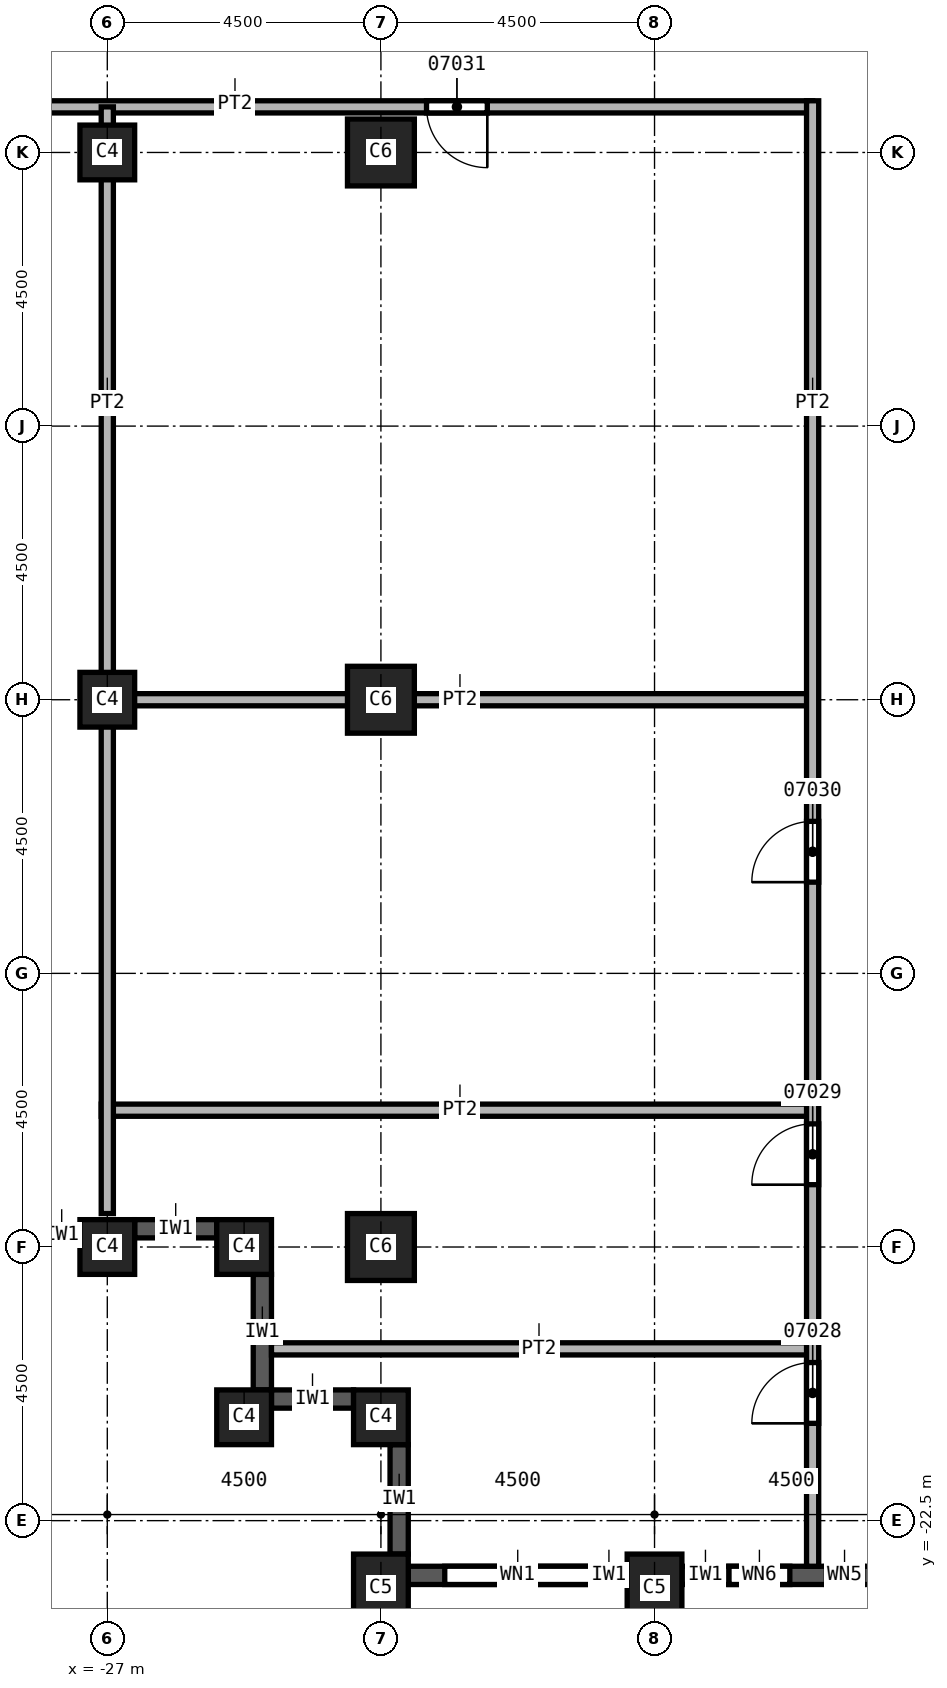
"""IFC4 building model, lengths in metres.
Left out: names, types, materials, properties, quantities, classifications, styles, units other than length and angle.
Written with IfcOpenShell. Run it as: python <this file> out.ifc"""

import sys

from ifc_helpers import new_model, si_unit, direction, frame, frame_2d, origin, origin_2d, place, context, subcontext, project, spatial, rectangle, extrude, element, fill, save


model = new_model("IFC4")
c1 = context("Model", 3, precision=1e-05, world=origin(), true_north=direction((0.0, 1.0)))
c2 = subcontext(c1, "Body", "Model", "MODEL_VIEW")
j1 = project(units=[si_unit("LENGTHUNIT", "METRE"), si_unit("PLANEANGLEUNIT", "RADIAN")], contexts=[c1])
p1 = place(None, origin())
s1 = spatial("IfcSite", under=j1, at=p1, CompositionType="ELEMENT")
p2 = place(p1, origin())
s2 = spatial("IfcBuilding", under=s1, at=p2, CompositionType="ELEMENT")
p3 = place(p2, frame((0.0, 0.0, 138.0)))
s3 = spatial("IfcBuildingStorey", under=s2, at=p3, CompositionType="ELEMENT", Elevation=138.0)
for number, where, z_axis, x_axis in (
    (1, (-22.5, 0.0, 0.0), (0.0, 0.0, 1.0), (1.0, 0.0, 0.0)),
    (2, (-22.5, -9.0, 0.0), (0.0, 0.0, 1.0), (1.0, 0.0, 0.0)),
    (3, (-22.5, -18.0, 0.0), (0.0, 0.0, 1.0), (1.0, 0.0, 0.0)),
):
    element("IfcColumn", number, at=place(p3, frame(where, z_axis=z_axis, x_axis=x_axis)), inside=s3, PredefinedType="COLUMN", context=c2, shape_type="SweptSolid", body=[
        extrude(rectangle(XDim=1.1, YDim=1.1, at=origin_2d()), origin(), (0.0, 0.0, 1.0), 3.7),
    ])
for number, where, z_axis, x_axis in (
    (4, (-18.0, -23.6, 0.0), (0.0, 0.0, 1.0), (1.0, 0.0, 0.0)),
    (5, (-22.5, -23.6, 0.0), (0.0, 0.0, 1.0), (1.0, 0.0, 0.0)),
):
    element("IfcColumn", number, at=place(p3, frame(where, z_axis=z_axis, x_axis=x_axis)), inside=s3, PredefinedType="COLUMN", context=c2, shape_type="SweptSolid", body=[
        extrude(rectangle(XDim=0.9, YDim=1.1, at=origin_2d()), origin(), (0.0, 0.0, 1.0), 3.7),
    ])
for number, where, z_axis, x_axis in (
    (6, (-27.0, 0.0, 0.0), (0.0, 0.0, 1.0), (1.0, 0.0, 0.0)),
    (7, (-27.0, -9.0, 0.0), (0.0, 0.0, 1.0), (1.0, 0.0, 0.0)),
    (8, (-27.0, -18.0, 0.0), (0.0, 0.0, 1.0), (1.0, 0.0, 0.0)),
    (9, (-22.5, -20.8, 0.0), (0.0, 0.0, 1.0), (1.0, 0.0, 0.0)),
    (10, (-24.75, -20.8, 0.0), (0.0, 0.0, 1.0), (1.0, 0.0, 0.0)),
    (11, (-24.75, -18.0, 0.0), (0.0, 0.0, 1.0), (1.0, 0.0, 0.0)),
):
    element("IfcColumn", number, at=place(p3, frame(where, z_axis=z_axis, x_axis=x_axis)), inside=s3, PredefinedType="COLUMN", context=c2, shape_type="SweptSolid", body=[
        extrude(rectangle(XDim=0.9, YDim=0.9, at=origin_2d()), origin(), (0.0, 0.0, 1.0), 3.7),
    ])
p4 = place(p3, frame((-31.05, -17.8, 0.0), z_axis=(0.0, 0.0, 1.0), x_axis=(1.0, 0.0, 0.0)))
e12 = element("IfcWall", 12, at=p4, inside=s3, PredefinedType="SOLIDWALL", context=c2, shape_type="SweptSolid", body=[
    extrude(rectangle(XDim=3.6, YDim=0.3, at=frame_2d((1.8, 0.0))), origin(), (0.0, 0.0, 1.0), 3.1),
])
p5 = place(p4, frame((0.6, 0.0, 0.8)))
e13 = element("IfcOpeningElement", 13, at=p5, cuts=e12, PredefinedType="OPENING", context=c2, shape_type="SweptSolid", body=[
    extrude(rectangle(XDim=1.0, YDim=1.95, at=frame_2d((0.5, 0.975))), frame((0.0, 0.15, 0.0), z_axis=(0.0, -1.0, 0.0), x_axis=(1.0, 0.0, 0.0)), (0.0, 0.0, 1.0), 0.3),
])
p6 = place(p4, frame((2.0, 0.0, 0.8)))
e14 = element("IfcOpeningElement", 14, at=p6, cuts=e12, PredefinedType="OPENING", context=c2, shape_type="SweptSolid", body=[
    extrude(rectangle(XDim=1.0, YDim=1.95, at=frame_2d((0.5, 0.975))), frame((0.0, 0.15, 0.0), z_axis=(0.0, -1.0, 0.0), x_axis=(1.0, 0.0, 0.0)), (0.0, 0.0, 1.0), 0.3),
])
p7 = place(p3, frame((-26.55, -17.7, 0.0), z_axis=(0.0, 0.0, 1.0), x_axis=(1.0, 0.0, 0.0)))
e15 = element("IfcWall", 15, at=p7, inside=s3, PredefinedType="SOLIDWALL", context=c2, shape_type="SweptSolid", body=[
    extrude(rectangle(XDim=1.35, YDim=0.3, at=frame_2d((0.675, 0.0))), origin(), (0.0, 0.0, 1.0), 3.1),
])
p8 = place(p3, frame((-24.45, -18.45, 0.0), z_axis=(0.0, 0.0, 1.0), x_axis=(0.0, -1.0, 0.0)))
e16 = element("IfcWall", 16, at=p8, inside=s3, PredefinedType="SOLIDWALL", context=c2, shape_type="SweptSolid", body=[
    extrude(rectangle(XDim=1.9, YDim=0.3, at=frame_2d((0.95, 0.0))), origin(), (0.0, 0.0, 1.0), 3.1),
])
p9 = place(p3, frame((-24.3, -20.5, 0.0), z_axis=(0.0, 0.0, 1.0), x_axis=(1.0, 0.0, 0.0)))
e17 = element("IfcWall", 17, at=p9, inside=s3, PredefinedType="SOLIDWALL", context=c2, shape_type="SweptSolid", body=[
    extrude(rectangle(XDim=1.35, YDim=0.3, at=frame_2d((0.675, 0.0))), origin(), (0.0, 0.0, 1.0), 3.1),
])
p10 = place(p3, frame((-22.2, -21.25, 0.0), z_axis=(0.0, 0.0, 1.0), x_axis=(0.0, -1.0, 0.0)))
e18 = element("IfcWall", 18, at=p10, inside=s3, PredefinedType="SOLIDWALL", context=c2, shape_type="SweptSolid", body=[
    extrude(rectangle(XDim=1.8, YDim=0.3, at=frame_2d((0.9, 0.0))), origin(), (0.0, 0.0, 1.0), 3.1),
])
p11 = place(p3, frame((-22.05, -23.4, 0.0), z_axis=(0.0, 0.0, 1.0), x_axis=(1.0, 0.0, 0.0)))
e19 = element("IfcWall", 19, at=p11, inside=s3, PredefinedType="SOLIDWALL", context=c2, shape_type="SweptSolid", body=[
    extrude(rectangle(XDim=3.6, YDim=0.3, at=frame_2d((1.8, 0.0))), origin(), (0.0, 0.0, 1.0), 3.1),
])
p12 = place(p11, frame((0.6, 0.0, 0.8)))
e20 = element("IfcOpeningElement", 20, at=p12, cuts=e19, PredefinedType="OPENING", context=c2, shape_type="SweptSolid", body=[
    extrude(rectangle(XDim=2.4, YDim=1.95, at=frame_2d((1.2, 0.975))), frame((0.0, 0.15, 0.0), z_axis=(0.0, -1.0, 0.0), x_axis=(1.0, 0.0, 0.0)), (0.0, 0.0, 1.0), 0.3),
])
p13 = place(p3, frame((-17.55, -23.4, 0.0), z_axis=(0.0, 0.0, 1.0), x_axis=(1.0, 0.0, 0.0)))
e21 = element("IfcWall", 21, at=p13, inside=s3, PredefinedType="SOLIDWALL", context=c2, shape_type="SweptSolid", body=[
    extrude(rectangle(XDim=3.6, YDim=0.3, at=frame_2d((1.8, 0.0))), origin(), (0.0, 0.0, 1.0), 3.1),
])
p14 = place(p13, frame((0.775, 0.0, 0.8)))
e22 = element("IfcOpeningElement", 22, at=p14, cuts=e21, PredefinedType="OPENING", context=c2, shape_type="SweptSolid", body=[
    extrude(rectangle(XDim=1.0, YDim=1.95, at=frame_2d((0.5, 0.975))), frame((0.0, 0.15, 0.0), z_axis=(0.0, -1.0, 0.0), x_axis=(1.0, 0.0, 0.0)), (0.0, 0.0, 1.0), 0.3),
])
p15 = place(p13, frame((2.375, 0.0, 0.8)))
e23 = element("IfcOpeningElement", 23, at=p15, cuts=e21, PredefinedType="OPENING", context=c2, shape_type="SweptSolid", body=[
    extrude(rectangle(XDim=0.6, YDim=1.95, at=frame_2d((0.3, 0.975))), frame((0.0, 0.15, 0.0), z_axis=(0.0, -1.0, 0.0), x_axis=(1.0, 0.0, 0.0)), (0.0, 0.0, 1.0), 0.3),
])
p16 = place(p3, frame((-15.4, 0.75, 0.0), z_axis=(0.0, 0.0, 1.0), x_axis=(-1.0, 0.0, 0.0)))
e24 = element("IfcWall", 24, at=p16, inside=s3, PredefinedType="PARTITIONING", context=c2, shape_type="SweptSolid", body=[
    extrude(rectangle(XDim=18.45, YDim=0.2, at=frame_2d((9.225, 0.0))), origin(), (0.0, 0.0, 1.0), 3.7),
])
p17 = place(p16, frame((5.35, 0.0, 0.0)))
e25 = element("IfcOpeningElement", 25, at=p17, cuts=e24, PredefinedType="OPENING", context=c2, shape_type="SweptSolid", body=[
    extrude(rectangle(XDim=1.0, YDim=2.1, at=frame_2d((0.5, 1.05))), frame((0.0, 0.1, 0.0), z_axis=(0.0, -1.0, 0.0), x_axis=(1.0, 0.0, 0.0)), (0.0, 0.0, 1.0), 0.2),
])
p18 = place(p16, frame((12.65, 0.0, 0.0)))
e26 = element("IfcOpeningElement", 26, at=p18, cuts=e24, PredefinedType="OPENING", context=c2, shape_type="SweptSolid", body=[
    extrude(rectangle(XDim=1.0, YDim=2.1, at=frame_2d((0.5, 1.05))), frame((0.0, 0.1, 0.0), z_axis=(0.0, -1.0, 0.0), x_axis=(1.0, 0.0, 0.0)), (0.0, 0.0, 1.0), 0.2),
])
for number, where, z_axis, x_axis in (
    (27, (-27.1, -15.75, 0.0), (0.0, 0.0, 1.0), (1.0, 0.0, 0.0)),
    (28, (-27.1, -9.0, 0.0), (0.0, 0.0, 1.0), (1.0, 0.0, 0.0)),
):
    element("IfcWall", number, at=place(p3, frame(where, z_axis=z_axis, x_axis=x_axis)), inside=s3, PredefinedType="PARTITIONING", context=c2, shape_type="SweptSolid", body=[
        extrude(rectangle(XDim=11.7, YDim=0.2, at=frame_2d((5.85, 0.0))), origin(), (0.0, 0.0, 1.0), 3.7),
    ])
p19 = place(p3, frame((-27.0, -17.45, 0.0), z_axis=(0.0, 0.0, 1.0), x_axis=(0.0, 1.0, 0.0)))
e29 = element("IfcWall", 29, at=p19, inside=s3, PredefinedType="PARTITIONING", context=c2, shape_type="SweptSolid", body=[
    extrude(rectangle(XDim=18.2, YDim=0.2, at=frame_2d((9.1, 0.0))), origin(), (0.0, 0.0, 1.0), 3.7),
])
p20 = place(p3, frame((-24.3, -19.675, 0.0), z_axis=(0.0, 0.0, 1.0), x_axis=(1.0, 0.0, 0.0)))
e30 = element("IfcWall", 30, at=p20, inside=s3, PredefinedType="PARTITIONING", context=c2, shape_type="SweptSolid", body=[
    extrude(rectangle(XDim=8.9, YDim=0.2, at=frame_2d((4.45, 0.0))), origin(), (0.0, 0.0, 1.0), 3.7),
])
p21 = place(p3, frame((-15.4, -23.25, 0.0), z_axis=(0.0, 0.0, 1.0), x_axis=(0.0, 1.0, 0.0)))
e31 = element("IfcWall", 31, at=p21, inside=s3, PredefinedType="PARTITIONING", context=c2, shape_type="SweptSolid", body=[
    extrude(rectangle(XDim=24.1, YDim=0.2, at=frame_2d((12.05, 0.0))), origin(), (0.0, 0.0, 1.0), 3.7),
])
p22 = place(p21, frame((2.35, 0.0, 0.0)))
e32 = element("IfcOpeningElement", 32, at=p22, cuts=e31, PredefinedType="OPENING", context=c2, shape_type="SweptSolid", body=[
    extrude(rectangle(XDim=1.0, YDim=2.1, at=frame_2d((0.5, 1.05))), frame((0.0, 0.1, 0.0), z_axis=(0.0, -1.0, 0.0), x_axis=(1.0, 0.0, 0.0)), (0.0, 0.0, 1.0), 0.2),
])
p23 = place(p21, frame((6.275, 0.0, 0.0)))
e33 = element("IfcOpeningElement", 33, at=p23, cuts=e31, PredefinedType="OPENING", context=c2, shape_type="SweptSolid", body=[
    extrude(rectangle(XDim=1.0, YDim=2.1, at=frame_2d((0.5, 1.05))), frame((0.0, 0.1, 0.0), z_axis=(0.0, -1.0, 0.0), x_axis=(1.0, 0.0, 0.0)), (0.0, 0.0, 1.0), 0.2),
])
p24 = place(p21, frame((11.25, 0.0, 0.0)))
e34 = element("IfcOpeningElement", 34, at=p24, cuts=e31, PredefinedType="OPENING", context=c2, shape_type="SweptSolid", body=[
    extrude(rectangle(XDim=1.0, YDim=2.1, at=frame_2d((0.5, 1.05))), frame((0.0, 0.1, 0.0), z_axis=(0.0, -1.0, 0.0), x_axis=(1.0, 0.0, 0.0)), (0.0, 0.0, 1.0), 0.2),
])
p25 = place(p12, origin())
e35 = element("IfcWindow", 35, at=p25, inside=s3, PartitioningType="SINGLE_PANEL", PredefinedType="WINDOW", context=c2, shape_type="SweptSolid", body=[
    extrude(rectangle(XDim=2.4, YDim=1.95, at=frame_2d((1.2, 0.975))), frame((0.0, 0.03, 0.0), z_axis=(0.0, -1.0, 0.0), x_axis=(1.0, 0.0, 0.0)), (0.0, 0.0, 1.0), 0.06),
])
fill(e20, e35)
p26 = place(p22, origin())
e36 = element("IfcDoor", 36, at=p26, inside=s3, OperationType="SINGLE_SWING_LEFT", PredefinedType="DOOR", context=c2, shape_type="SweptSolid", body=[
    extrude(rectangle(XDim=1.0, YDim=2.1, at=frame_2d((0.5, 1.05))), frame((0.0, 0.025, 0.0), z_axis=(0.0, -1.0, 0.0), x_axis=(1.0, 0.0, 0.0)), (0.0, 0.0, 1.0), 0.05),
])
fill(e32, e36)
p27 = place(p23, origin())
e37 = element("IfcDoor", 37, at=p27, inside=s3, OperationType="SINGLE_SWING_RIGHT", PredefinedType="DOOR", context=c2, shape_type="SweptSolid", body=[
    extrude(rectangle(XDim=1.0, YDim=2.1, at=frame_2d((0.5, 1.05))), frame((0.0, 0.025, 0.0), z_axis=(0.0, -1.0, 0.0), x_axis=(1.0, 0.0, 0.0)), (0.0, 0.0, 1.0), 0.05),
])
fill(e33, e37)
p28 = place(p24, origin())
e38 = element("IfcDoor", 38, at=p28, inside=s3, OperationType="SINGLE_SWING_LEFT", PredefinedType="DOOR", context=c2, shape_type="SweptSolid", body=[
    extrude(rectangle(XDim=1.0, YDim=2.1, at=frame_2d((0.5, 1.05))), frame((0.0, 0.025, 0.0), z_axis=(0.0, -1.0, 0.0), x_axis=(1.0, 0.0, 0.0)), (0.0, 0.0, 1.0), 0.05),
])
fill(e34, e38)
p29 = place(p17, origin())
e39 = element("IfcDoor", 39, at=p29, inside=s3, OperationType="SINGLE_SWING_RIGHT", PredefinedType="DOOR", context=c2, shape_type="SweptSolid", body=[
    extrude(rectangle(XDim=1.0, YDim=2.1, at=frame_2d((0.5, 1.05))), frame((0.0, 0.025, 0.0), z_axis=(0.0, -1.0, 0.0), x_axis=(1.0, 0.0, 0.0)), (0.0, 0.0, 1.0), 0.05),
])
fill(e25, e39)
p30 = place(p14, origin())
e40 = element("IfcWindow", 40, at=p30, inside=s3, PartitioningType="SINGLE_PANEL", PredefinedType="WINDOW", context=c2, shape_type="SweptSolid", body=[
    extrude(rectangle(XDim=1.0, YDim=1.95, at=frame_2d((0.5, 0.975))), frame((0.0, 0.03, 0.0), z_axis=(0.0, -1.0, 0.0), x_axis=(1.0, 0.0, 0.0)), (0.0, 0.0, 1.0), 0.06),
])
fill(e22, e40)
p31 = place(p15, origin())
e41 = element("IfcWindow", 41, at=p31, inside=s3, PartitioningType="SINGLE_PANEL", PredefinedType="WINDOW", context=c2, shape_type="SweptSolid", body=[
    extrude(rectangle(XDim=0.6, YDim=1.95, at=frame_2d((0.3, 0.975))), frame((0.0, 0.03, 0.0), z_axis=(0.0, -1.0, 0.0), x_axis=(1.0, 0.0, 0.0)), (0.0, 0.0, 1.0), 0.06),
])
fill(e23, e41)
save(model, sys.argv[1])
